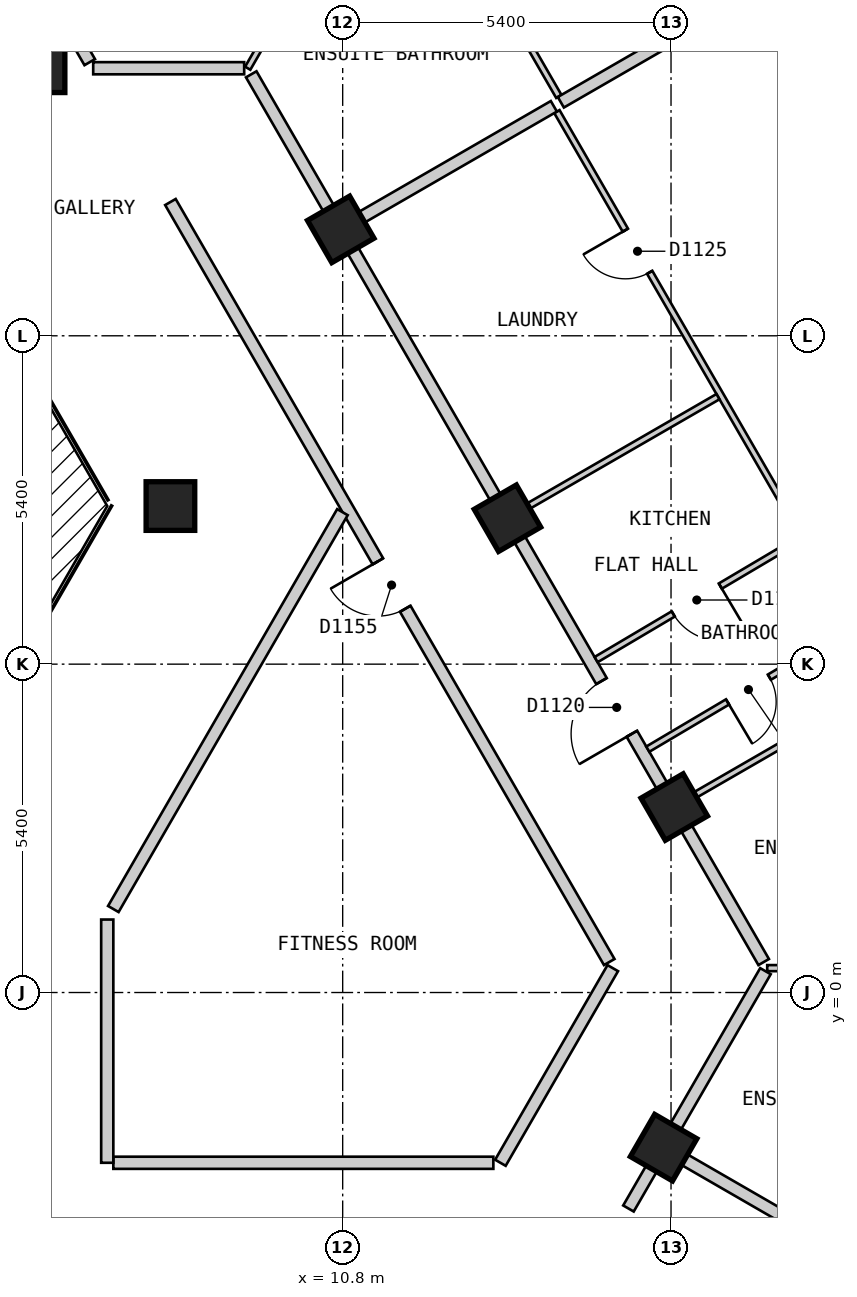
"""IFC4 building model, lengths in metres.
Left out: names, types, materials, properties, quantities, classifications, styles, units other than length and angle.
Written with IfcOpenShell. Run it as: python <this file> out.ifc"""

import sys

from ifc_helpers import new_model, si_unit, direction, frame, frame_2d, origin, origin_2d, place, context, subcontext, project, spatial, polyline, rectangle, outline, extrude, element, fill, save


model = new_model("IFC4")
c1 = context("Model", 3, precision=1e-05, world=origin(), true_north=direction((0.0, 1.0)))
c2 = subcontext(c1, "Body", "Model", "MODEL_VIEW")
j1 = project(units=[si_unit("LENGTHUNIT", "METRE"), si_unit("PLANEANGLEUNIT", "RADIAN")], contexts=[c1])
p1 = place(None, origin())
s1 = spatial("IfcSite", under=j1, at=p1, CompositionType="ELEMENT")
p2 = place(p1, origin())
s2 = spatial("IfcBuilding", under=s1, at=p2, CompositionType="ELEMENT")
p3 = place(p2, frame((0.0, 0.0, 150.6)))
s3 = spatial("IfcBuildingStorey", under=s2, at=p3, CompositionType="ELEMENT", Elevation=150.6)
for number, where, z_axis, x_axis in (
    (1, (16.078, -2.551, 0.0), (0.0, 0.0, 1.0), (0.5, 0.866, 0.0)),
    (2, (16.253, 3.05, 0.0), (0.0, 0.0, 1.0), (-0.5, 0.866, 0.0)),
    (3, (13.51, 7.8, 0.0), (0.0, 0.0, 1.0), (-0.5, 0.866, 0.0)),
    (4, (7.967, 8.0, 0.0), (0.0, 0.0, 1.0), (1.0, 0.0, 0.0)),
    (5, (10.768, 12.55, 0.0), (0.0, 0.0, 1.0), (-0.5, 0.866, 0.0)),
    (6, (5.831, 15.2, 0.0), (0.0, 0.0, 1.0), (-1.0, 0.0, 0.0)),
):
    element("IfcColumn", number, at=place(p3, frame(where, z_axis=z_axis, x_axis=x_axis)), inside=s3, PredefinedType="COLUMN", context=c2, shape_type="SweptSolid", body=[
        extrude(rectangle(XDim=0.8, YDim=0.8, at=origin_2d()), origin(), (0.0, 0.0, 1.0), 3.0),
    ])
p4 = place(p3, frame((15.862, -23.425, 0.0), z_axis=(0.0, 0.0, 1.0), x_axis=(0.500017503135, 0.866015298109, 0.0)))
e7 = element("IfcWall", 7, at=p4, inside=s3, PredefinedType="SOLIDWALL", context=c2, shape_type="SweptSolid", body=[
    extrude(outline(polyline([(0.0, -0.15), (24.711, -0.15), (24.631, 0.15), (0.08, 0.15), (0.0, -0.15)])), origin(), (0.0, 0.0, 1.0), 2.6),
])
p5 = place(p4, frame((1.4, 0.0, 0.15)))
e8 = element("IfcOpeningElement", 8, at=p5, cuts=e7, PredefinedType="OPENING", context=c2, shape_type="SweptSolid", body=[
    extrude(rectangle(XDim=1.5, YDim=2.1, at=frame_2d((0.75, 1.05))), frame((0.0, 0.16, 0.0), z_axis=(0.0, -1.0, 0.0), x_axis=(1.0, 0.0, 0.0)), (0.0, 0.0, 1.0), 0.32),
])
p6 = place(p4, frame((4.316, 0.0, 0.15)))
e9 = element("IfcOpeningElement", 9, at=p6, cuts=e7, PredefinedType="OPENING", context=c2, shape_type="SweptSolid", body=[
    extrude(rectangle(XDim=1.5, YDim=2.1, at=frame_2d((0.75, 1.05))), frame((0.0, 0.16, 0.0), z_axis=(0.0, -1.0, 0.0), x_axis=(1.0, 0.0, 0.0)), (0.0, 0.0, 1.0), 0.32),
])
p7 = place(p4, frame((7.231, 0.0, 0.15)))
e10 = element("IfcOpeningElement", 10, at=p7, cuts=e7, PredefinedType="OPENING", context=c2, shape_type="SweptSolid", body=[
    extrude(rectangle(XDim=1.5, YDim=2.1, at=frame_2d((0.75, 1.05))), frame((0.0, 0.16, 0.0), z_axis=(0.0, -1.0, 0.0), x_axis=(1.0, 0.0, 0.0)), (0.0, 0.0, 1.0), 0.32),
])
p8 = place(p4, frame((10.147, 0.0, 0.15)))
e11 = element("IfcOpeningElement", 11, at=p8, cuts=e7, PredefinedType="OPENING", context=c2, shape_type="SweptSolid", body=[
    extrude(rectangle(XDim=1.5, YDim=2.1, at=frame_2d((0.75, 1.05))), frame((0.0, 0.16, 0.0), z_axis=(0.0, -1.0, 0.0), x_axis=(1.0, 0.0, 0.0)), (0.0, 0.0, 1.0), 0.32),
])
p9 = place(p4, frame((13.062, 0.0, 0.15)))
e12 = element("IfcOpeningElement", 12, at=p9, cuts=e7, PredefinedType="OPENING", context=c2, shape_type="SweptSolid", body=[
    extrude(rectangle(XDim=1.5, YDim=2.1, at=frame_2d((0.75, 1.05))), frame((0.0, 0.16, 0.0), z_axis=(0.0, -1.0, 0.0), x_axis=(1.0, 0.0, 0.0)), (0.0, 0.0, 1.0), 0.32),
])
p10 = place(p4, frame((15.977, 0.0, 0.15)))
e13 = element("IfcOpeningElement", 13, at=p10, cuts=e7, PredefinedType="OPENING", context=c2, shape_type="SweptSolid", body=[
    extrude(rectangle(XDim=1.5, YDim=2.1, at=frame_2d((0.75, 1.05))), frame((0.0, 0.16, 0.0), z_axis=(0.0, -1.0, 0.0), x_axis=(1.0, 0.0, 0.0)), (0.0, 0.0, 1.0), 0.32),
])
p11 = place(p4, frame((18.893, 0.0, 0.15)))
e14 = element("IfcOpeningElement", 14, at=p11, cuts=e7, PredefinedType="OPENING", context=c2, shape_type="SweptSolid", body=[
    extrude(rectangle(XDim=1.5, YDim=2.1, at=frame_2d((0.75, 1.05))), frame((0.0, 0.16, 0.0), z_axis=(0.0, -1.0, 0.0), x_axis=(1.0, 0.0, 0.0)), (0.0, 0.0, 1.0), 0.32),
])
p12 = place(p4, frame((21.809, 0.0, 0.15)))
e15 = element("IfcOpeningElement", 15, at=p12, cuts=e7, PredefinedType="OPENING", context=c2, shape_type="SweptSolid", body=[
    extrude(rectangle(XDim=1.5, YDim=2.1, at=frame_2d((0.75, 1.05))), frame((0.0, 0.16, 0.0), z_axis=(0.0, -1.0, 0.0), x_axis=(1.0, 0.0, 0.0)), (0.0, 0.0, 1.0), 0.32),
])
p13 = place(p3, frame((28.218, 2.825, 0.0), z_axis=(0.0, 0.0, 1.0), x_axis=(-0.500020536353, 0.866013546791, 0.0)))
e16 = element("IfcWall", 16, at=p13, inside=s3, PredefinedType="SOLIDWALL", context=c2, shape_type="SweptSolid", body=[
    extrude(outline(polyline([(0.0, -0.15), (23.325, -0.15), (23.245, 0.15), (0.08, 0.15), (0.0, -0.15)])), origin(), (0.0, 0.0, 1.0), 2.6),
])
p14 = place(p13, frame((1.314, 0.0, 0.15)))
e17 = element("IfcOpeningElement", 17, at=p14, cuts=e16, PredefinedType="OPENING", context=c2, shape_type="SweptSolid", body=[
    extrude(rectangle(XDim=1.5, YDim=2.1, at=frame_2d((0.75, 1.05))), frame((0.0, 0.16, 0.0), z_axis=(0.0, -1.0, 0.0), x_axis=(1.0, 0.0, 0.0)), (0.0, 0.0, 1.0), 0.32),
])
p15 = place(p13, frame((4.056, 0.0, 0.15)))
e18 = element("IfcOpeningElement", 18, at=p15, cuts=e16, PredefinedType="OPENING", context=c2, shape_type="SweptSolid", body=[
    extrude(rectangle(XDim=1.5, YDim=2.1, at=frame_2d((0.75, 1.05))), frame((0.0, 0.16, 0.0), z_axis=(0.0, -1.0, 0.0), x_axis=(1.0, 0.0, 0.0)), (0.0, 0.0, 1.0), 0.32),
])
p16 = place(p13, frame((6.798, 0.0, 0.15)))
e19 = element("IfcOpeningElement", 19, at=p16, cuts=e16, PredefinedType="OPENING", context=c2, shape_type="SweptSolid", body=[
    extrude(rectangle(XDim=1.5, YDim=2.1, at=frame_2d((0.75, 1.05))), frame((0.0, 0.16, 0.0), z_axis=(0.0, -1.0, 0.0), x_axis=(1.0, 0.0, 0.0)), (0.0, 0.0, 1.0), 0.32),
])
p17 = place(p13, frame((9.541, 0.0, 0.15)))
e20 = element("IfcOpeningElement", 20, at=p17, cuts=e16, PredefinedType="OPENING", context=c2, shape_type="SweptSolid", body=[
    extrude(rectangle(XDim=1.5, YDim=2.1, at=frame_2d((0.75, 1.05))), frame((0.0, 0.16, 0.0), z_axis=(0.0, -1.0, 0.0), x_axis=(1.0, 0.0, 0.0)), (0.0, 0.0, 1.0), 0.32),
])
p18 = place(p13, frame((12.284, 0.0, 0.15)))
e21 = element("IfcOpeningElement", 21, at=p18, cuts=e16, PredefinedType="OPENING", context=c2, shape_type="SweptSolid", body=[
    extrude(rectangle(XDim=1.5, YDim=2.1, at=frame_2d((0.75, 1.05))), frame((0.0, 0.16, 0.0), z_axis=(0.0, -1.0, 0.0), x_axis=(1.0, 0.0, 0.0)), (0.0, 0.0, 1.0), 0.32),
])
p19 = place(p13, frame((15.027, 0.0, 0.15)))
e22 = element("IfcOpeningElement", 22, at=p19, cuts=e16, PredefinedType="OPENING", context=c2, shape_type="SweptSolid", body=[
    extrude(rectangle(XDim=1.5, YDim=2.1, at=frame_2d((0.75, 1.05))), frame((0.0, 0.16, 0.0), z_axis=(0.0, -1.0, 0.0), x_axis=(1.0, 0.0, 0.0)), (0.0, 0.0, 1.0), 0.32),
])
p20 = place(p13, frame((17.769, 0.0, 0.15)))
e23 = element("IfcOpeningElement", 23, at=p20, cuts=e16, PredefinedType="OPENING", context=c2, shape_type="SweptSolid", body=[
    extrude(rectangle(XDim=1.5, YDim=2.1, at=frame_2d((0.75, 1.05))), frame((0.0, 0.16, 0.0), z_axis=(0.0, -1.0, 0.0), x_axis=(1.0, 0.0, 0.0)), (0.0, 0.0, 1.0), 0.32),
])
p21 = place(p13, frame((20.511, 0.0, 0.15)))
e24 = element("IfcOpeningElement", 24, at=p21, cuts=e16, PredefinedType="OPENING", context=c2, shape_type="SweptSolid", body=[
    extrude(rectangle(XDim=1.5, YDim=2.1, at=frame_2d((0.75, 1.05))), frame((0.0, 0.16, 0.0), z_axis=(0.0, -1.0, 0.0), x_axis=(1.0, 0.0, 0.0)), (0.0, 0.0, 1.0), 0.32),
])
p22 = place(p3, frame((5.485, 17.3, 0.0), z_axis=(0.0, 0.0, 1.0), x_axis=(0.500027479704, -0.866009537788, 0.0)))
e25 = element("IfcWall", 25, at=p22, inside=s3, PredefinedType="PARTITIONING", context=c2, shape_type="SweptSolid", body=[
    extrude(rectangle(XDim=2.309, YDim=0.2, at=frame_2d((1.155, 0.0))), origin(), (0.0, 0.0, 1.0), 2.6),
])
p23 = place(p3, frame((7.967, 13.0, 0.0), z_axis=(0.0, 0.0, 1.0), x_axis=(0.50003774998, -0.866003607726, 0.0)))
e26 = element("IfcWall", 26, at=p23, inside=s3, PredefinedType="PARTITIONING", context=c2, shape_type="SweptSolid", body=[
    extrude(rectangle(XDim=14.433, YDim=0.2, at=frame_2d((7.217, 0.0))), origin(), (0.0, 0.0, 1.0), 2.6),
])
p24 = place(p23, frame((6.824, 0.0, 0.0)))
e27 = element("IfcOpeningElement", 27, at=p24, cuts=e26, PredefinedType="OPENING", context=c2, shape_type="SweptSolid", body=[
    extrude(rectangle(XDim=0.9, YDim=2.1, at=frame_2d((0.45, 1.05))), frame((0.0, 0.11, 0.0), z_axis=(0.0, -1.0, 0.0), x_axis=(1.0, 0.0, 0.0)), (0.0, 0.0, 1.0), 0.22),
])
p25 = place(p3, frame((9.296, 15.1, 0.0), z_axis=(0.0, 0.0, 1.0), x_axis=(0.499974024244, -0.866040400375, 0.0)))
e28 = element("IfcWall", 28, at=p25, inside=s3, PredefinedType="PARTITIONING", context=c2, shape_type="SweptSolid", body=[
    extrude(rectangle(XDim=16.857, YDim=0.2, at=frame_2d((8.429, 0.0))), origin(), (0.0, 0.0, 1.0), 2.6),
])
p26 = place(p25, frame((11.522, 0.0, 0.0)))
e29 = element("IfcOpeningElement", 29, at=p26, cuts=e28, PredefinedType="OPENING", context=c2, shape_type="SweptSolid", body=[
    extrude(rectangle(XDim=1.0, YDim=2.1, at=frame_2d((0.5, 1.05))), frame((0.0, 0.11, 0.0), z_axis=(0.0, -1.0, 0.0), x_axis=(1.0, 0.0, 0.0)), (0.0, 0.0, 1.0), 0.22),
])
p27 = place(p3, frame((7.028, -2.8, 0.0), z_axis=(0.0, 0.0, 1.0), x_axis=(1.0, 0.0, 0.0)))
e30 = element("IfcWall", 30, at=p27, inside=s3, PredefinedType="PARTITIONING", context=c2, shape_type="SweptSolid", body=[
    extrude(rectangle(XDim=6.25, YDim=0.2, at=frame_2d((3.125, 0.0))), origin(), (0.0, 0.0, 1.0), 2.6),
])
p28 = place(p3, frame((6.697, 15.2, 0.0), z_axis=(0.0, 0.0, 1.0), x_axis=(1.0, 0.0, 0.0)))
e31 = element("IfcWall", 31, at=p28, inside=s3, PredefinedType="PARTITIONING", context=c2, shape_type="SweptSolid", body=[
    extrude(rectangle(XDim=2.483, YDim=0.2, at=frame_2d((1.241, 0.0))), origin(), (0.0, 0.0, 1.0), 2.6),
])
p29 = place(p3, frame((7.028, 1.373, 0.0), z_axis=(0.0, 0.0, 1.0), x_axis=(0.499954271211, 0.866051803703, 0.0)))
e32 = element("IfcWall", 32, at=p29, inside=s3, PredefinedType="PARTITIONING", context=c2, shape_type="SweptSolid", body=[
    extrude(rectangle(XDim=7.536, YDim=0.2, at=frame_2d((3.768, 0.0))), origin(), (0.0, 0.0, 1.0), 2.6),
])
p30 = place(p3, frame((13.394, -2.8, 0.0), z_axis=(0.0, 0.0, 1.0), x_axis=(0.499968324138, 0.866043691079, 0.0)))
e33 = element("IfcWall", 33, at=p30, inside=s3, PredefinedType="PARTITIONING", context=c2, shape_type="SweptSolid", body=[
    extrude(rectangle(XDim=3.696, YDim=0.2, at=frame_2d((1.848, 0.0))), origin(), (0.0, 0.0, 1.0), 2.6),
])
p31 = place(p3, frame((15.5, -3.552, 0.0), z_axis=(0.0, 0.0, 1.0), x_axis=(0.499914724673, 0.86607463192, 0.0)))
e34 = element("IfcWall", 34, at=p31, inside=s3, PredefinedType="PARTITIONING", context=c2, shape_type="SweptSolid", body=[
    extrude(rectangle(XDim=4.507, YDim=0.2, at=frame_2d((2.253, 0.0))), origin(), (0.0, 0.0, 1.0), 2.6),
])
p32 = place(p3, frame((6.928, -2.8, 0.0), z_axis=(0.0, 0.0, 1.0), x_axis=(0.0, 1.0, 0.0)))
e35 = element("IfcWall", 35, at=p32, inside=s3, PredefinedType="PARTITIONING", context=c2, shape_type="SweptSolid", body=[
    extrude(rectangle(XDim=4.0, YDim=0.2, at=frame_2d((2.0, 0.0))), origin(), (0.0, 0.0, 1.0), 2.6),
])
p33 = place(p3, frame((14.323, 14.487, 0.0), z_axis=(0.0, 0.0, 1.0), x_axis=(0.500011052545, -0.866019022501, 0.0)))
e36 = element("IfcWall", 36, at=p33, inside=s3, PredefinedType="PARTITIONING", context=c2, shape_type="SweptSolid", body=[
    extrude(rectangle(XDim=16.208, YDim=0.1, at=frame_2d((8.104, 0.0))), origin(), (0.0, 0.0, 1.0), 2.6),
])
p34 = place(p33, frame((8.484, 0.0, 0.0)))
e37 = element("IfcOpeningElement", 37, at=p34, cuts=e36, PredefinedType="OPENING", context=c2, shape_type="SweptSolid", body=[
    extrude(rectangle(XDim=0.9, YDim=2.1, at=frame_2d((0.45, 1.05))), frame((0.0, 0.06, 0.0), z_axis=(0.0, -1.0, 0.0), x_axis=(1.0, 0.0, 0.0)), (0.0, 0.0, 1.0), 0.12),
])
p35 = place(p33, frame((2.252, 0.0, 0.0)))
e38 = element("IfcOpeningElement", 38, at=p35, cuts=e36, PredefinedType="OPENING", context=c2, shape_type="SweptSolid", body=[
    extrude(rectangle(XDim=0.8, YDim=2.1, at=frame_2d((0.4, 1.05))), frame((0.0, 0.06, 0.0), z_axis=(0.0, -1.0, 0.0), x_axis=(1.0, 0.0, 0.0)), (0.0, 0.0, 1.0), 0.12),
])
p36 = place(p33, frame((13.167, 0.0, 0.0)))
e39 = element("IfcOpeningElement", 39, at=p36, cuts=e36, PredefinedType="OPENING", context=c2, shape_type="SweptSolid", body=[
    extrude(rectangle(XDim=0.8, YDim=2.1, at=frame_2d((0.4, 1.05))), frame((0.0, 0.06, 0.0), z_axis=(0.0, -1.0, 0.0), x_axis=(1.0, 0.0, 0.0)), (0.0, 0.0, 1.0), 0.12),
])
p37 = place(p3, frame((11.713, 19.313, 0.0), z_axis=(0.0, 0.0, 1.0), x_axis=(0.499945064984, -0.866057118208, 0.0)))
e40 = element("IfcWall", 40, at=p37, inside=s3, PredefinedType="PARTITIONING", context=c2, shape_type="SweptSolid", body=[
    extrude(rectangle(XDim=5.285, YDim=0.1, at=frame_2d((2.642, 0.0))), origin(), (0.0, 0.0, 1.0), 2.6),
])
p38 = place(p37, frame((2.242, 0.0, 0.0)))
e41 = element("IfcOpeningElement", 41, at=p38, cuts=e40, PredefinedType="OPENING", context=c2, shape_type="SweptSolid", body=[
    extrude(rectangle(XDim=0.8, YDim=2.1, at=frame_2d((0.4, 1.05))), frame((0.0, 0.06, 0.0), z_axis=(0.0, -1.0, 0.0), x_axis=(1.0, 0.0, 0.0)), (0.0, 0.0, 1.0), 0.12),
])
p39 = place(p3, frame((17.782, 0.401, 0.0), z_axis=(0.0, 0.0, 1.0), x_axis=(1.0, 0.0, 0.0)))
e42 = element("IfcWall", 42, at=p39, inside=s3, PredefinedType="PARTITIONING", context=c2, shape_type="SweptSolid", body=[
    extrude(rectangle(XDim=4.616, YDim=0.1, at=frame_2d((2.308, 0.0))), origin(), (0.0, 0.0, 1.0), 2.6),
])
p40 = place(p3, frame((9.238, 15.2, 0.0), z_axis=(0.0, 0.0, 1.0), x_axis=(0.499988022762, 0.866032318735, 0.0)))
e43 = element("IfcWall", 43, at=p40, inside=s3, PredefinedType="PARTITIONING", context=c2, shape_type="SweptSolid", body=[
    extrude(rectangle(XDim=4.748, YDim=0.1, at=frame_2d((2.374, 0.0))), origin(), (0.0, 0.0, 1.0), 2.6),
])
p41 = place(p3, frame((16.339, 3.1, 0.0), z_axis=(0.0, 0.0, 1.0), x_axis=(0.866031112038, 0.499990112884, 0.0)))
e44 = element("IfcWall", 44, at=p41, inside=s3, PredefinedType="PARTITIONING", context=c2, shape_type="SweptSolid", body=[
    extrude(rectangle(XDim=3.948, YDim=0.1, at=frame_2d((1.974, 0.0))), origin(), (0.0, 0.0, 1.0), 2.6),
])
p42 = place(p3, frame((13.597, 7.85, 0.0), z_axis=(0.0, 0.0, 1.0), x_axis=(0.865979019114, 0.500080332001, 0.0)))
e45 = element("IfcWall", 45, at=p42, inside=s3, PredefinedType="PARTITIONING", context=c2, shape_type="SweptSolid", body=[
    extrude(rectangle(XDim=3.897, YDim=0.1, at=frame_2d((1.949, 0.0))), origin(), (0.0, 0.0, 1.0), 2.6),
])
p43 = place(p3, frame((15.818, 4.002, 0.0), z_axis=(0.0, 0.0, 1.0), x_axis=(0.860457323494, 0.509522516132, 0.0)))
e46 = element("IfcWall", 46, at=p43, inside=s3, PredefinedType="PARTITIONING", context=c2, shape_type="SweptSolid", body=[
    extrude(rectangle(XDim=3.898, YDim=0.1, at=frame_2d((1.949, 0.0))), origin(), (0.0, 0.0, 1.0), 2.6),
])
p44 = place(p43, frame((1.524, 0.0, 0.0)))
e47 = element("IfcOpeningElement", 47, at=p44, cuts=e46, PredefinedType="OPENING", context=c2, shape_type="SweptSolid", body=[
    extrude(rectangle(XDim=0.8, YDim=2.1, at=frame_2d((0.4, 1.05))), frame((0.0, 0.06, 0.0), z_axis=(0.0, -1.0, 0.0), x_axis=(1.0, 0.0, 0.0)), (0.0, 0.0, 1.0), 0.12),
])
p45 = place(p3, frame((14.968, 5.475, 0.0), z_axis=(0.0, 0.0, 1.0), x_axis=(0.860594613521, 0.509290596005, 0.0)))
e48 = element("IfcWall", 48, at=p45, inside=s3, PredefinedType="PARTITIONING", context=c2, shape_type="SweptSolid", body=[
    extrude(rectangle(XDim=3.897, YDim=0.1, at=frame_2d((1.949, 0.0))), origin(), (0.0, 0.0, 1.0), 2.6),
])
p46 = place(p45, frame((1.474, 0.0, 0.0)))
e49 = element("IfcOpeningElement", 49, at=p46, cuts=e48, PredefinedType="OPENING", context=c2, shape_type="SweptSolid", body=[
    extrude(rectangle(XDim=0.9, YDim=2.1, at=frame_2d((0.45, 1.05))), frame((0.0, 0.06, 0.0), z_axis=(0.0, -1.0, 0.0), x_axis=(1.0, 0.0, 0.0)), (0.0, 0.0, 1.0), 0.12),
])
p47 = place(p3, frame((16.165, -2.601, 0.0), z_axis=(0.0, 0.0, 1.0), x_axis=(0.866016855193, -0.500014806302, 0.0)))
e50 = element("IfcWall", 50, at=p47, inside=s3, PredefinedType="PARTITIONING", context=c2, shape_type="SweptSolid", body=[
    extrude(rectangle(XDim=10.0, YDim=0.2, at=frame_2d((5.0, 0.0))), origin(), (0.0, 0.0, 1.0), 2.6),
])
p48 = place(p3, frame((10.854, 12.6, 0.0), z_axis=(0.0, 0.0, 1.0), x_axis=(0.866031112038, 0.499990112884, 0.0)))
e51 = element("IfcWall", 51, at=p48, inside=s3, PredefinedType="PARTITIONING", context=c2, shape_type="SweptSolid", body=[
    extrude(rectangle(XDim=3.948, YDim=0.2, at=frame_2d((1.974, 0.0))), origin(), (0.0, 0.0, 1.0), 2.6),
])
p49 = place(p3, frame((14.388, 14.64, 0.0), z_axis=(0.0, 0.0, 1.0), x_axis=(0.866044090212, 0.499967632761, 0.0)))
e52 = element("IfcWall", 52, at=p49, inside=s3, PredefinedType="PARTITIONING", context=c2, shape_type="SweptSolid", body=[
    extrude(rectangle(XDim=5.919, YDim=0.2, at=frame_2d((2.959, 0.0))), origin(), (0.0, 0.0, 1.0), 2.6),
])
p50 = place(p26, origin())
e53 = element("IfcDoor", 53, at=p50, inside=s3, OperationType="SINGLE_SWING_RIGHT", PredefinedType="DOOR", context=c2, shape_type="SweptSolid", body=[
    extrude(rectangle(XDim=1.0, YDim=2.1, at=frame_2d((0.5, 1.05))), frame((0.0, 0.025, 0.0), z_axis=(0.0, -1.0, 0.0), x_axis=(1.0, 0.0, 0.0)), (0.0, 0.0, 1.0), 0.05),
])
fill(e29, e53)
p51 = place(p44, origin())
e54 = element("IfcDoor", 54, at=p51, inside=s3, OperationType="SINGLE_SWING_LEFT", PredefinedType="DOOR", context=c2, shape_type="SweptSolid", body=[
    extrude(rectangle(XDim=0.8, YDim=2.1, at=frame_2d((0.4, 1.05))), frame((0.0, 0.025, 0.0), z_axis=(0.0, -1.0, 0.0), x_axis=(1.0, 0.0, 0.0)), (0.0, 0.0, 1.0), 0.05),
])
fill(e47, e54)
p52 = place(p46, origin())
e55 = element("IfcDoor", 55, at=p52, inside=s3, OperationType="SINGLE_SWING_RIGHT", PredefinedType="DOOR", context=c2, shape_type="SweptSolid", body=[
    extrude(rectangle(XDim=0.9, YDim=2.1, at=frame_2d((0.45, 1.05))), frame((0.0, 0.025, 0.0), z_axis=(0.0, -1.0, 0.0), x_axis=(1.0, 0.0, 0.0)), (0.0, 0.0, 1.0), 0.05),
])
fill(e49, e55)
p53 = place(p35, origin())
e56 = element("IfcDoor", 56, at=p53, inside=s3, OperationType="SINGLE_SWING_LEFT", PredefinedType="DOOR", context=c2, shape_type="SweptSolid", body=[
    extrude(rectangle(XDim=0.8, YDim=2.1, at=frame_2d((0.4, 1.05))), frame((0.0, 0.025, 0.0), z_axis=(0.0, -1.0, 0.0), x_axis=(1.0, 0.0, 0.0)), (0.0, 0.0, 1.0), 0.05),
])
fill(e38, e56)
p54 = place(p24, origin())
e57 = element("IfcDoor", 57, at=p54, inside=s3, OperationType="SINGLE_SWING_LEFT", PredefinedType="DOOR", context=c2, shape_type="SweptSolid", body=[
    extrude(rectangle(XDim=0.9, YDim=2.1, at=frame_2d((0.45, 1.05))), frame((0.0, 0.025, 0.0), z_axis=(0.0, -1.0, 0.0), x_axis=(1.0, 0.0, 0.0)), (0.0, 0.0, 1.0), 0.05),
])
fill(e27, e57)
save(model, sys.argv[1])
